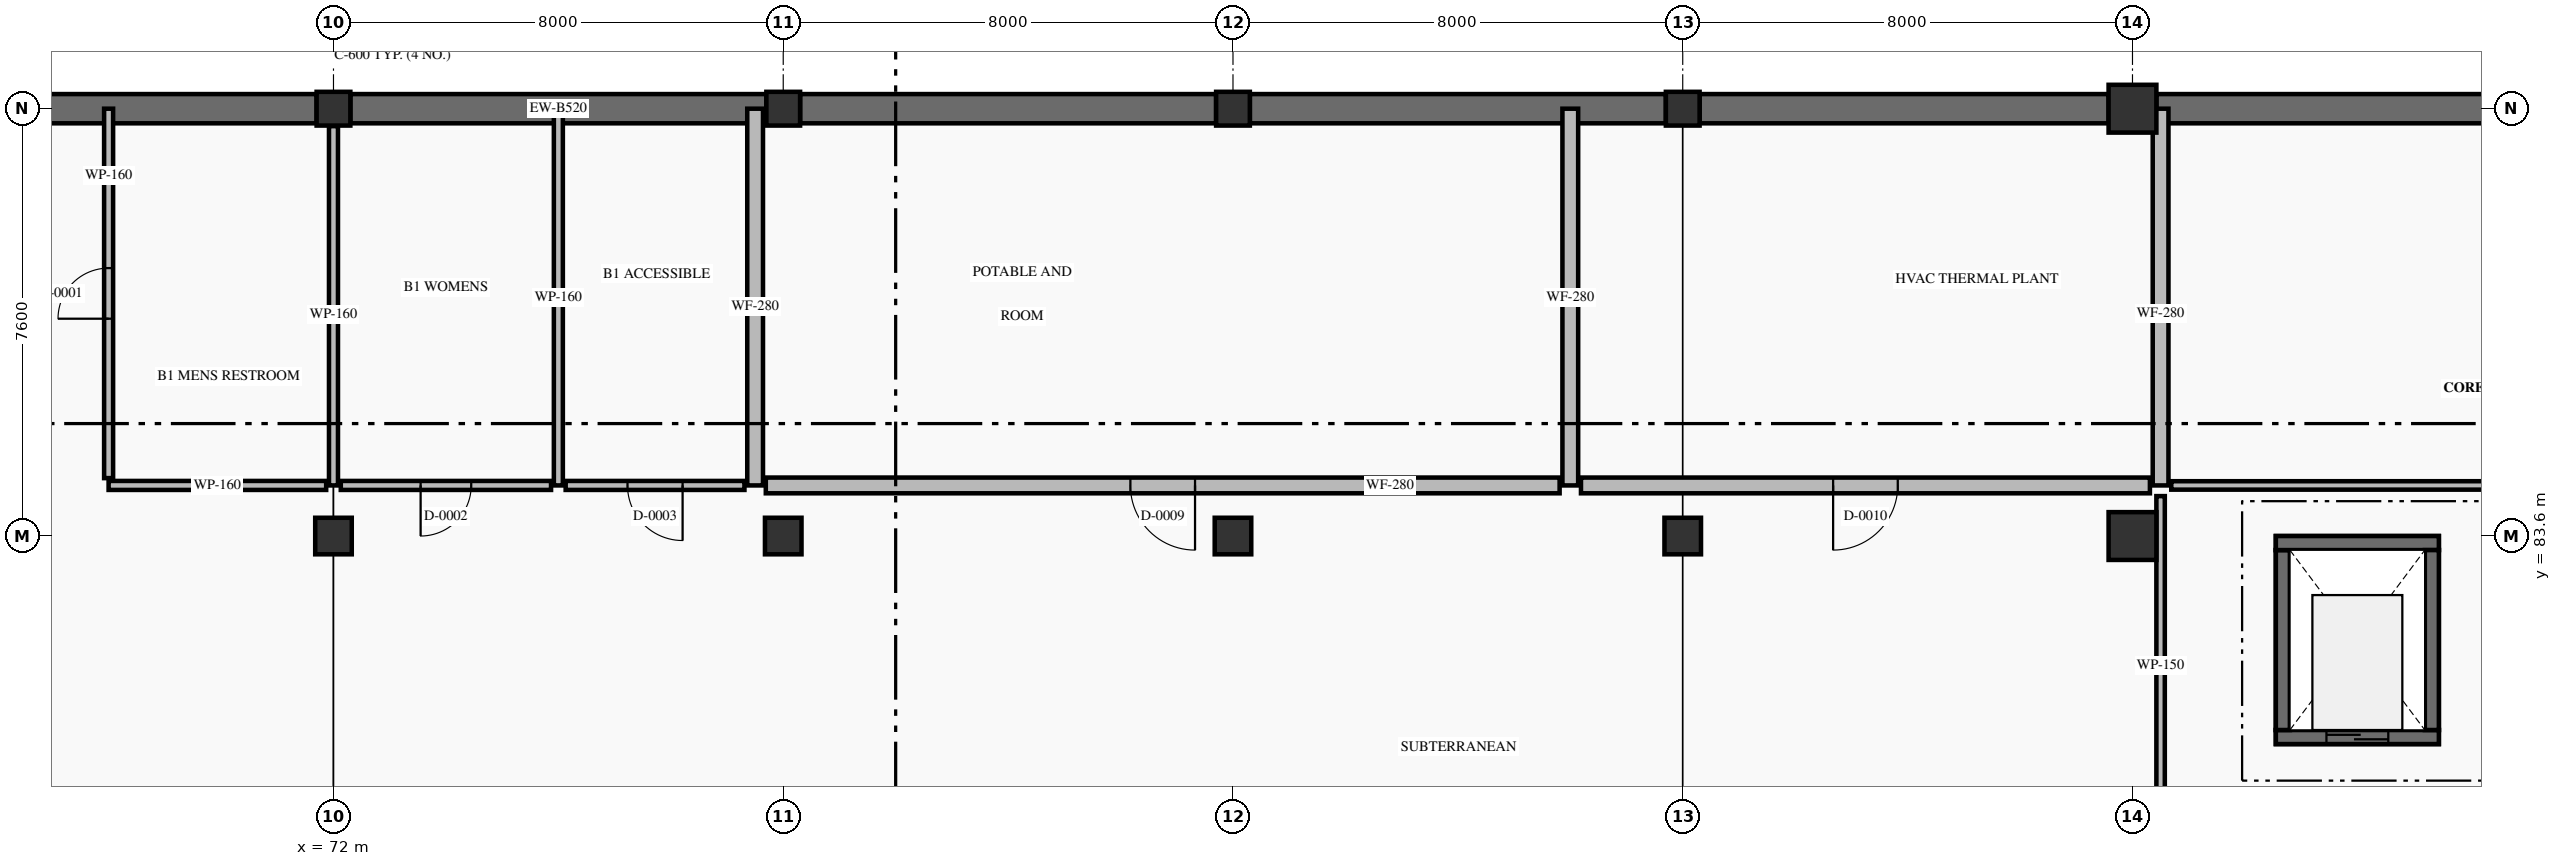
"""IFC4 building model, lengths in metres.
Left out: names, types, materials, properties, quantities, classifications, styles, units other than length and angle.
Written with IfcOpenShell. Run it as: python <this file> out.ifc"""

import sys

from ifc_helpers import new_model, si_unit, direction, frame, frame_2d, origin, origin_2d, place, context, subcontext, project, spatial, rectangle, extrude, element, fill, save


model = new_model("IFC4")
c1 = context("Model", 3, precision=1e-05, world=origin(), true_north=direction((0.0, 1.0)))
c2 = subcontext(c1, "Body", "Model", "MODEL_VIEW")
j1 = project(units=[si_unit("LENGTHUNIT", "METRE"), si_unit("PLANEANGLEUNIT", "RADIAN")], contexts=[c1])
p1 = place(None, origin())
s1 = spatial("IfcSite", under=j1, at=p1, CompositionType="ELEMENT")
p2 = place(p1, origin())
s2 = spatial("IfcBuilding", under=s1, at=p2, CompositionType="ELEMENT")
p3 = place(p2, frame((0.0, 0.0, -4.5)))
s3 = spatial("IfcBuildingStorey", under=s2, at=p3, CompositionType="ELEMENT", Elevation=-4.5)
p4 = place(p3, frame((72.0, 83.6, 0.0), z_axis=(0.0, 0.0, 1.0), x_axis=(1.0, 0.0, 0.0)))
e1 = element("IfcColumn", 1, at=p4, inside=s3, PredefinedType="COLUMN", context=c2, shape_type="SweptSolid", body=[
    extrude(rectangle(XDim=0.65, YDim=0.65, at=origin_2d()), origin(), (0.0, 0.0, 1.0), 4.5),
])
p5 = place(p3, frame((72.0, 91.2, 0.0), z_axis=(0.0, 0.0, 1.0), x_axis=(1.0, 0.0, 0.0)))
e2 = element("IfcColumn", 2, at=p5, inside=s3, PredefinedType="COLUMN", context=c2, shape_type="SweptSolid", body=[
    extrude(rectangle(XDim=0.6, YDim=0.6, at=origin_2d()), origin(), (0.0, 0.0, 1.0), 4.5),
])
p6 = place(p3, frame((80.0, 83.6, 0.0), z_axis=(0.0, 0.0, 1.0), x_axis=(1.0, 0.0, 0.0)))
e3 = element("IfcColumn", 3, at=p6, inside=s3, PredefinedType="COLUMN", context=c2, shape_type="SweptSolid", body=[
    extrude(rectangle(XDim=0.65, YDim=0.65, at=origin_2d()), origin(), (0.0, 0.0, 1.0), 4.5),
])
p7 = place(p3, frame((80.0, 91.2, 0.0), z_axis=(0.0, 0.0, 1.0), x_axis=(1.0, 0.0, 0.0)))
e4 = element("IfcColumn", 4, at=p7, inside=s3, PredefinedType="COLUMN", context=c2, shape_type="SweptSolid", body=[
    extrude(rectangle(XDim=0.6, YDim=0.6, at=origin_2d()), origin(), (0.0, 0.0, 1.0), 4.5),
])
p8 = place(p3, frame((88.0, 83.6, 0.0), z_axis=(0.0, 0.0, 1.0), x_axis=(1.0, 0.0, 0.0)))
e5 = element("IfcColumn", 5, at=p8, inside=s3, PredefinedType="COLUMN", context=c2, shape_type="SweptSolid", body=[
    extrude(rectangle(XDim=0.65, YDim=0.65, at=origin_2d()), origin(), (0.0, 0.0, 1.0), 4.5),
])
p9 = place(p3, frame((88.0, 91.2, 0.0), z_axis=(0.0, 0.0, 1.0), x_axis=(1.0, 0.0, 0.0)))
e6 = element("IfcColumn", 6, at=p9, inside=s3, PredefinedType="COLUMN", context=c2, shape_type="SweptSolid", body=[
    extrude(rectangle(XDim=0.6, YDim=0.6, at=origin_2d()), origin(), (0.0, 0.0, 1.0), 4.5),
])
p10 = place(p3, frame((96.0, 83.6, 0.0), z_axis=(0.0, 0.0, 1.0), x_axis=(1.0, 0.0, 0.0)))
e7 = element("IfcColumn", 7, at=p10, inside=s3, PredefinedType="COLUMN", context=c2, shape_type="SweptSolid", body=[
    extrude(rectangle(XDim=0.65, YDim=0.65, at=origin_2d()), origin(), (0.0, 0.0, 1.0), 4.5),
])
p11 = place(p3, frame((96.0, 91.2, 0.0), z_axis=(0.0, 0.0, 1.0), x_axis=(1.0, 0.0, 0.0)))
e8 = element("IfcColumn", 8, at=p11, inside=s3, PredefinedType="COLUMN", context=c2, shape_type="SweptSolid", body=[
    extrude(rectangle(XDim=0.6, YDim=0.6, at=origin_2d()), origin(), (0.0, 0.0, 1.0), 4.5),
])
for number, where, z_axis, x_axis in (
    (9, (104.0, 83.6, 0.0), (0.0, 0.0, 1.0), (1.0, 0.0, 0.0)),
    (10, (104.0, 91.2, 0.0), (0.0, 0.0, 1.0), (1.0, 0.0, 0.0)),
):
    element("IfcColumn", number, at=place(p3, frame(where, z_axis=z_axis, x_axis=x_axis)), inside=s3, PredefinedType="COLUMN", context=c2, shape_type="SweptSolid", body=[
        extrude(rectangle(XDim=0.85, YDim=0.85, at=origin_2d()), origin(), (0.0, 0.0, 1.0), 4.5),
    ])
p12 = place(p3, frame((64.425, 91.2, 0.0), z_axis=(0.0, 0.0, 1.0), x_axis=(1.0, 0.0, 0.0)))
e11 = element("IfcWall", 11, at=p12, inside=s3, PredefinedType="SHEAR", context=c2, shape_type="SweptSolid", body=[
    extrude(rectangle(XDim=7.275, YDim=0.52, at=frame_2d((3.637, 0.0))), origin(), (0.0, 0.0, 1.0), 3.4),
])
for number, where, z_axis, x_axis in (
    (12, (72.3, 91.2, 0.0), (0.0, 0.0, 1.0), (1.0, 0.0, 0.0)),
    (13, (80.3, 91.2, 0.0), (0.0, 0.0, 1.0), (1.0, 0.0, 0.0)),
):
    element("IfcWall", number, at=place(p3, frame(where, z_axis=z_axis, x_axis=x_axis)), inside=s3, PredefinedType="SHEAR", context=c2, shape_type="SweptSolid", body=[
        extrude(rectangle(XDim=7.4, YDim=0.52, at=frame_2d((3.7, 0.0))), origin(), (0.0, 0.0, 1.0), 3.4),
    ])
p13 = place(p3, frame((88.3, 91.2, 0.0), z_axis=(0.0, 0.0, 1.0), x_axis=(1.0, 0.0, 0.0)))
e14 = element("IfcWall", 14, at=p13, inside=s3, PredefinedType="SHEAR", context=c2, shape_type="SweptSolid", body=[
    extrude(rectangle(XDim=7.4, YDim=0.52, at=frame_2d((3.7, 0.0))), origin(), (0.0, 0.0, 1.0), 4.2),
])
p14 = place(p3, frame((96.3, 91.2, 0.0), z_axis=(0.0, 0.0, 1.0), x_axis=(1.0, 0.0, 0.0)))
e15 = element("IfcWall", 15, at=p14, inside=s3, PredefinedType="SHEAR", context=c2, shape_type="SweptSolid", body=[
    extrude(rectangle(XDim=7.275, YDim=0.52, at=frame_2d((3.637, 0.0))), origin(), (0.0, 0.0, 1.0), 4.2),
])
p15 = place(p3, frame((104.425, 91.2, 0.0), z_axis=(0.0, 0.0, 1.0), x_axis=(1.0, 0.0, 0.0)))
e16 = element("IfcWall", 16, at=p15, inside=s3, PredefinedType="SHEAR", context=c2, shape_type="SweptSolid", body=[
    extrude(rectangle(XDim=7.15, YDim=0.52, at=frame_2d((3.575, 0.0))), origin(), (0.0, 0.0, 1.0), 3.4),
])
p16 = place(p3, frame((109.45, 80.025, -1.35), z_axis=(0.0, 0.0, 1.0), x_axis=(-1.0, 0.0, 0.0)))
e17 = element("IfcWall", 17, at=p16, inside=s3, PredefinedType="SHEAR", context=c2, shape_type="SweptSolid", body=[
    extrude(rectangle(XDim=2.9, YDim=0.25, at=frame_2d((1.45, 0.0))), origin(), (0.0, 0.0, 1.0), 1.35),
])
p17 = place(p3, frame((106.675, 80.15, -1.35), z_axis=(0.0, 0.0, 1.0), x_axis=(0.0, 1.0, 0.0)))
e18 = element("IfcWall", 18, at=p17, inside=s3, PredefinedType="SHEAR", context=c2, shape_type="SweptSolid", body=[
    extrude(rectangle(XDim=3.2, YDim=0.25, at=frame_2d((1.6, 0.0))), origin(), (0.0, 0.0, 1.0), 1.35),
])
p18 = place(p3, frame((106.55, 83.475, -1.35), z_axis=(0.0, 0.0, 1.0), x_axis=(1.0, 0.0, 0.0)))
e19 = element("IfcWall", 19, at=p18, inside=s3, PredefinedType="SHEAR", context=c2, shape_type="SweptSolid", body=[
    extrude(rectangle(XDim=2.9, YDim=0.25, at=frame_2d((1.45, 0.0))), origin(), (0.0, 0.0, 1.0), 1.35),
])
p19 = place(p3, frame((109.325, 83.35, -1.35), z_axis=(0.0, 0.0, 1.0), x_axis=(0.0, -1.0, 0.0)))
e20 = element("IfcWall", 20, at=p19, inside=s3, PredefinedType="SHEAR", context=c2, shape_type="SweptSolid", body=[
    extrude(rectangle(XDim=3.2, YDim=0.25, at=frame_2d((1.6, 0.0))), origin(), (0.0, 0.0, 1.0), 1.35),
])
p20 = place(p3, frame((109.45, 80.025, 0.0), z_axis=(0.0, 0.0, 1.0), x_axis=(-1.0, 0.0, 0.0)))
e21 = element("IfcWall", 21, at=p20, inside=s3, PredefinedType="SHEAR", context=c2, shape_type="SweptSolid", body=[
    extrude(rectangle(XDim=2.9, YDim=0.25, at=frame_2d((1.45, 0.0))), origin(), (0.0, 0.0, 1.0), 4.5),
])
p21 = place(p20, frame((0.9, 0.0, 0.0)))
e22 = element("IfcOpeningElement", 22, at=p21, cuts=e21, PredefinedType="OPENING", context=c2, shape_type="SweptSolid", body=[
    extrude(rectangle(XDim=1.1, YDim=2.15, at=frame_2d((0.55, 1.075))), frame((0.0, 0.135, 0.0), z_axis=(0.0, -1.0, 0.0), x_axis=(1.0, 0.0, 0.0)), (0.0, 0.0, 1.0), 0.27),
])
p22 = place(p3, frame((106.675, 80.15, 0.0), z_axis=(0.0, 0.0, 1.0), x_axis=(0.0, 1.0, 0.0)))
e23 = element("IfcWall", 23, at=p22, inside=s3, PredefinedType="SHEAR", context=c2, shape_type="SweptSolid", body=[
    extrude(rectangle(XDim=3.2, YDim=0.25, at=frame_2d((1.6, 0.0))), origin(), (0.0, 0.0, 1.0), 4.5),
])
p23 = place(p3, frame((106.55, 83.475, 0.0), z_axis=(0.0, 0.0, 1.0), x_axis=(1.0, 0.0, 0.0)))
e24 = element("IfcWall", 24, at=p23, inside=s3, PredefinedType="SHEAR", context=c2, shape_type="SweptSolid", body=[
    extrude(rectangle(XDim=2.9, YDim=0.25, at=frame_2d((1.45, 0.0))), origin(), (0.0, 0.0, 1.0), 4.5),
])
p24 = place(p3, frame((109.325, 83.35, 0.0), z_axis=(0.0, 0.0, 1.0), x_axis=(0.0, -1.0, 0.0)))
e25 = element("IfcWall", 25, at=p24, inside=s3, PredefinedType="SHEAR", context=c2, shape_type="SweptSolid", body=[
    extrude(rectangle(XDim=3.2, YDim=0.25, at=frame_2d((1.6, 0.0))), origin(), (0.0, 0.0, 1.0), 4.5),
])
p25 = place(p3, frame((72.0, 90.89, 0.0), z_axis=(0.0, 0.0, 1.0), x_axis=(0.0, -1.0, 0.0)))
e26 = element("IfcWall", 26, at=p25, inside=s3, PredefinedType="PARTITIONING", context=c2, shape_type="SweptSolid", body=[
    extrude(rectangle(XDim=6.39, YDim=0.16, at=frame_2d((3.195, 0.0))), origin(), (0.0, 0.0, 1.0), 3.5),
])
p26 = place(p3, frame((71.87, 84.5, 0.0), z_axis=(0.0, 0.0, 1.0), x_axis=(-1.0, 0.0, 0.0)))
e27 = element("IfcWall", 27, at=p26, inside=s3, PredefinedType="PARTITIONING", context=c2, shape_type="SweptSolid", body=[
    extrude(rectangle(XDim=3.87, YDim=0.16, at=frame_2d((1.935, 0.0))), origin(), (0.0, 0.0, 1.0), 4.2),
])
p27 = place(p3, frame((68.0, 84.63, 0.0), z_axis=(0.0, 0.0, 1.0), x_axis=(0.0, 1.0, 0.0)))
e28 = element("IfcWall", 28, at=p27, inside=s3, PredefinedType="PARTITIONING", context=c2, shape_type="SweptSolid", body=[
    extrude(rectangle(XDim=6.57, YDim=0.16, at=frame_2d((3.285, 0.0))), origin(), (0.0, 0.0, 1.0), 3.7),
])
p28 = place(p27, frame((2.835, 0.0, 0.0)))
e29 = element("IfcOpeningElement", 29, at=p28, cuts=e28, PredefinedType="OPENING", context=c2, shape_type="SweptSolid", body=[
    extrude(rectangle(XDim=0.9, YDim=2.1, at=frame_2d((0.45, 1.05))), frame((0.0, 0.09, 0.0), z_axis=(0.0, -1.0, 0.0), x_axis=(1.0, 0.0, 0.0)), (0.0, 0.0, 1.0), 0.18),
])
p29 = place(p3, frame((76.0, 91.2, 0.0), z_axis=(0.0, 0.0, 1.0), x_axis=(0.0, -1.0, 0.0)))
e30 = element("IfcWall", 30, at=p29, inside=s3, PredefinedType="PARTITIONING", context=c2, shape_type="SweptSolid", body=[
    extrude(rectangle(XDim=6.7, YDim=0.16, at=frame_2d((3.35, 0.0))), origin(), (0.0, 0.0, 1.0), 3.7),
])
p30 = place(p3, frame((75.87, 84.5, 0.0), z_axis=(0.0, 0.0, 1.0), x_axis=(-1.0, 0.0, 0.0)))
e31 = element("IfcWall", 31, at=p30, inside=s3, PredefinedType="PARTITIONING", context=c2, shape_type="SweptSolid", body=[
    extrude(rectangle(XDim=3.74, YDim=0.16, at=frame_2d((1.87, 0.0))), origin(), (0.0, 0.0, 1.0), 4.2),
])
p31 = place(p30, frame((1.42, 0.0, 0.0)))
e32 = element("IfcOpeningElement", 32, at=p31, cuts=e31, PredefinedType="OPENING", context=c2, shape_type="SweptSolid", body=[
    extrude(rectangle(XDim=0.9, YDim=2.1, at=frame_2d((0.45, 1.05))), frame((0.0, 0.09, 0.0), z_axis=(0.0, -1.0, 0.0), x_axis=(1.0, 0.0, 0.0)), (0.0, 0.0, 1.0), 0.18),
])
p32 = place(p3, frame((79.5, 91.2, 0.0), z_axis=(0.0, 0.0, 1.0), x_axis=(0.0, -1.0, 0.0)))
e33 = element("IfcWall", 33, at=p32, inside=s3, PredefinedType="STANDARD", context=c2, shape_type="SweptSolid", body=[
    extrude(rectangle(XDim=6.7, YDim=0.28, at=frame_2d((3.35, 0.0))), origin(), (0.0, 0.0, 1.0), 4.2),
])
p33 = place(p3, frame((79.31, 84.5, 0.0), z_axis=(0.0, 0.0, 1.0), x_axis=(-1.0, 0.0, 0.0)))
e34 = element("IfcWall", 34, at=p33, inside=s3, PredefinedType="PARTITIONING", context=c2, shape_type="SweptSolid", body=[
    extrude(rectangle(XDim=3.18, YDim=0.16, at=frame_2d((1.59, 0.0))), origin(), (0.0, 0.0, 1.0), 4.2),
])
p34 = place(p33, frame((1.1, 0.0, 0.0)))
e35 = element("IfcOpeningElement", 35, at=p34, cuts=e34, PredefinedType="OPENING", context=c2, shape_type="SweptSolid", body=[
    extrude(rectangle(XDim=0.98, YDim=2.1, at=frame_2d((0.49, 1.05))), frame((0.0, 0.09, 0.0), z_axis=(0.0, -1.0, 0.0), x_axis=(1.0, 0.0, 0.0)), (0.0, 0.0, 1.0), 0.18),
])
p35 = place(p3, frame((94.0, 91.2, 0.0), z_axis=(0.0, 0.0, 1.0), x_axis=(0.0, -1.0, 0.0)))
e36 = element("IfcWall", 36, at=p35, inside=s3, PredefinedType="STANDARD", context=c2, shape_type="SweptSolid", body=[
    extrude(rectangle(XDim=6.7, YDim=0.28, at=frame_2d((3.35, 0.0))), origin(), (0.0, 0.0, 1.0), 4.2),
])
p36 = place(p3, frame((93.81, 84.5, 0.0), z_axis=(0.0, 0.0, 1.0), x_axis=(-1.0, 0.0, 0.0)))
e37 = element("IfcWall", 37, at=p36, inside=s3, PredefinedType="STANDARD", context=c2, shape_type="SweptSolid", body=[
    extrude(rectangle(XDim=14.12, YDim=0.28, at=frame_2d((7.06, 0.0))), origin(), (0.0, 0.0, 1.0), 4.2),
])
p37 = place(p36, frame((6.485, 0.0, 0.0)))
e38 = element("IfcOpeningElement", 38, at=p37, cuts=e37, PredefinedType="OPENING", context=c2, shape_type="SweptSolid", body=[
    extrude(rectangle(XDim=1.15, YDim=2.2, at=frame_2d((0.575, 1.1))), frame((0.0, 0.15, 0.0), z_axis=(0.0, -1.0, 0.0), x_axis=(1.0, 0.0, 0.0)), (0.0, 0.0, 1.0), 0.3),
])
p38 = place(p3, frame((104.5, 91.2, 0.0), z_axis=(0.0, 0.0, 1.0), x_axis=(0.0, -1.0, 0.0)))
e39 = element("IfcWall", 39, at=p38, inside=s3, PredefinedType="STANDARD", context=c2, shape_type="SweptSolid", body=[
    extrude(rectangle(XDim=6.7, YDim=0.28, at=frame_2d((3.35, 0.0))), origin(), (0.0, 0.0, 1.0), 4.2),
])
p39 = place(p3, frame((104.31, 84.5, 0.0), z_axis=(0.0, 0.0, 1.0), x_axis=(-1.0, 0.0, 0.0)))
e40 = element("IfcWall", 40, at=p39, inside=s3, PredefinedType="STANDARD", context=c2, shape_type="SweptSolid", body=[
    extrude(rectangle(XDim=10.12, YDim=0.28, at=frame_2d((5.06, 0.0))), origin(), (0.0, 0.0, 1.0), 4.2),
])
p40 = place(p39, frame((4.485, 0.0, 0.0)))
e41 = element("IfcOpeningElement", 41, at=p40, cuts=e40, PredefinedType="OPENING", context=c2, shape_type="SweptSolid", body=[
    extrude(rectangle(XDim=1.15, YDim=2.2, at=frame_2d((0.575, 1.1))), frame((0.0, 0.15, 0.0), z_axis=(0.0, -1.0, 0.0), x_axis=(1.0, 0.0, 0.0)), (0.0, 0.0, 1.0), 0.3),
])
p41 = place(p3, frame((104.5, 76.0, 0.0), z_axis=(0.0, 0.0, 1.0), x_axis=(0.0, 1.0, 0.0)))
e42 = element("IfcWall", 42, at=p41, inside=s3, PredefinedType="PARTITIONING", context=c2, shape_type="SweptSolid", body=[
    extrude(rectangle(XDim=8.31, YDim=0.15, at=frame_2d((4.155, 0.0))), origin(), (0.0, 0.0, 1.0), 4.2),
])
p42 = place(p41, frame((2.18, 0.0, 0.0)))
e43 = element("IfcOpeningElement", 43, at=p42, cuts=e42, PredefinedType="OPENING", context=c2, shape_type="SweptSolid", body=[
    extrude(rectangle(XDim=0.95, YDim=2.1, at=frame_2d((0.475, 1.05))), frame((0.0, 0.085, 0.0), z_axis=(0.0, -1.0, 0.0), x_axis=(1.0, 0.0, 0.0)), (0.0, 0.0, 1.0), 0.17),
])
p43 = place(p3, frame((104.69, 84.5, 0.0), z_axis=(0.0, 0.0, 1.0), x_axis=(1.0, 0.0, 0.0)))
e44 = element("IfcWall", 44, at=p43, inside=s3, PredefinedType="PARTITIONING", context=c2, shape_type="SweptSolid", body=[
    extrude(rectangle(XDim=16.81, YDim=0.15, at=frame_2d((8.405, 0.0))), origin(), (0.0, 0.0, 1.0), 4.2),
])
p44 = place(p21, origin())
e45 = element("IfcDoor", 45, at=p44, inside=s3, OperationType="DOUBLE_DOOR_SLIDING", PredefinedType="DOOR", context=c2, shape_type="SweptSolid", body=[
    extrude(rectangle(XDim=1.1, YDim=2.15, at=frame_2d((0.55, 1.075))), frame((0.0, 0.025, 0.0), z_axis=(0.0, -1.0, 0.0), x_axis=(1.0, 0.0, 0.0)), (0.0, 0.0, 1.0), 0.05),
])
fill(e22, e45)
p45 = place(p28, origin())
e46 = element("IfcDoor", 46, at=p45, inside=s3, OperationType="SINGLE_SWING_LEFT", PredefinedType="DOOR", context=c2, shape_type="SweptSolid", body=[
    extrude(rectangle(XDim=0.9, YDim=2.1, at=frame_2d((0.45, 1.05))), frame((0.0, 0.025, 0.0), z_axis=(0.0, -1.0, 0.0), x_axis=(1.0, 0.0, 0.0)), (0.0, 0.0, 1.0), 0.05),
])
fill(e29, e46)
p46 = place(p31, origin())
e47 = element("IfcDoor", 47, at=p46, inside=s3, OperationType="SINGLE_SWING_RIGHT", PredefinedType="DOOR", context=c2, shape_type="SweptSolid", body=[
    extrude(rectangle(XDim=0.9, YDim=2.1, at=frame_2d((0.45, 1.05))), frame((0.0, 0.025, 0.0), z_axis=(0.0, -1.0, 0.0), x_axis=(1.0, 0.0, 0.0)), (0.0, 0.0, 1.0), 0.05),
])
fill(e32, e47)
p47 = place(p34, origin())
e48 = element("IfcDoor", 48, at=p47, inside=s3, OperationType="SINGLE_SWING_LEFT", PredefinedType="DOOR", context=c2, shape_type="SweptSolid", body=[
    extrude(rectangle(XDim=0.98, YDim=2.1, at=frame_2d((0.49, 1.05))), frame((0.0, 0.025, 0.0), z_axis=(0.0, -1.0, 0.0), x_axis=(1.0, 0.0, 0.0)), (0.0, 0.0, 1.0), 0.05),
])
fill(e35, e48)
p48 = place(p37, origin())
e49 = element("IfcDoor", 49, at=p48, inside=s3, OperationType="SINGLE_SWING_LEFT", PredefinedType="DOOR", context=c2, shape_type="SweptSolid", body=[
    extrude(rectangle(XDim=1.15, YDim=2.2, at=frame_2d((0.575, 1.1))), frame((0.0, 0.025, 0.0), z_axis=(0.0, -1.0, 0.0), x_axis=(1.0, 0.0, 0.0)), (0.0, 0.0, 1.0), 0.05),
])
fill(e38, e49)
p49 = place(p40, origin())
e50 = element("IfcDoor", 50, at=p49, inside=s3, OperationType="SINGLE_SWING_RIGHT", PredefinedType="DOOR", context=c2, shape_type="SweptSolid", body=[
    extrude(rectangle(XDim=1.15, YDim=2.2, at=frame_2d((0.575, 1.1))), frame((0.0, 0.025, 0.0), z_axis=(0.0, -1.0, 0.0), x_axis=(1.0, 0.0, 0.0)), (0.0, 0.0, 1.0), 0.05),
])
fill(e41, e50)
save(model, sys.argv[1])
